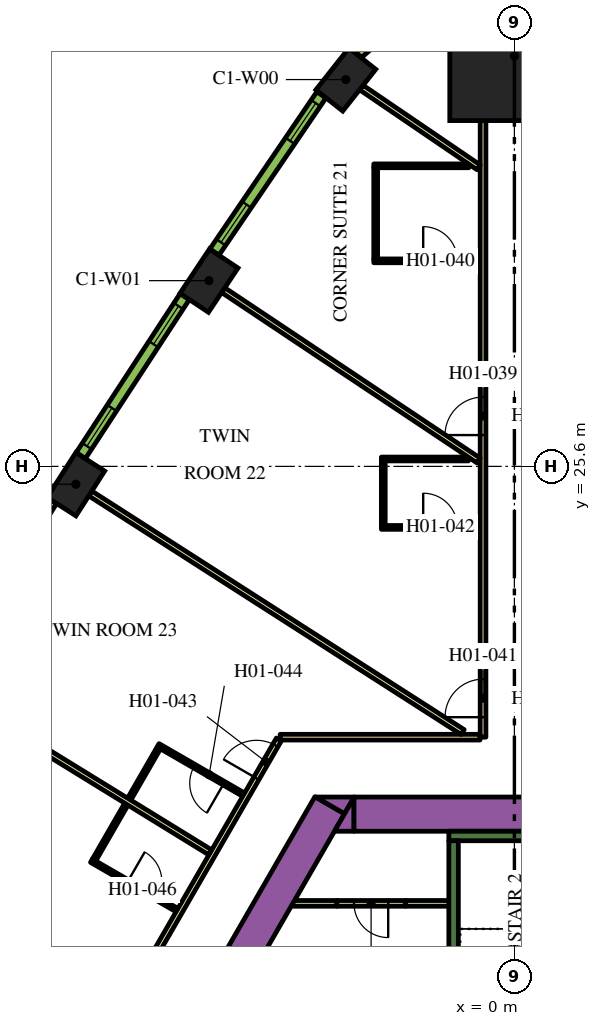
"""IFC4 building model, lengths in metres.
Left out: names, types, materials, properties, quantities, classifications, styles, units other than length and angle.
Written with IfcOpenShell. Run it as: python <this file> out.ifc"""

import sys

from ifc_helpers import new_model, si_unit, direction, frame, frame_2d, origin, origin_2d, place, context, subcontext, project, spatial, polyline, rectangle, outline, extrude, element, fill, save


model = new_model("IFC4")
c1 = context("Model", 3, precision=1e-05, world=origin(), true_north=direction((0.0, 1.0)))
c2 = subcontext(c1, "Body", "Model", "MODEL_VIEW")
j1 = project(units=[si_unit("LENGTHUNIT", "METRE"), si_unit("PLANEANGLEUNIT", "RADIAN")], contexts=[c1])
p1 = place(None, origin())
s1 = spatial("IfcSite", under=j1, at=p1, CompositionType="ELEMENT")
p2 = place(p1, origin())
s2 = spatial("IfcBuilding", under=s1, at=p2, CompositionType="ELEMENT")
p3 = place(p2, frame((0.0, 0.0, 27.6)))
s3 = spatial("IfcBuildingStorey", under=s2, at=p3, CompositionType="ELEMENT", Elevation=27.6)
p4 = place(p3, frame((0.0, 36.399, 0.0), z_axis=(0.0, 0.0, 1.0), x_axis=(0.0, 1.0, 0.0)))
e1 = element("IfcColumn", 1, at=p4, inside=s3, PredefinedType="COLUMN", context=c2, shape_type="SweptSolid", body=[
    extrude(rectangle(XDim=3.4, YDim=3.4, at=origin_2d()), origin(), (0.0, 0.0, 1.0), 3.9),
])
for number, where, z_axis, x_axis in (
    (2, (-4.436, 35.778, 0.0), (0.0, 0.0, 1.0), (-0.62, -0.784, 0.0)),
    (3, (-8.037, 30.487, 0.0), (0.0, 0.0, 1.0), (-0.555, -0.832, 0.0)),
    (4, (-11.539, 25.131, 0.0), (0.0, 0.0, 1.0), (-0.539, -0.842, 0.0)),
):
    element("IfcColumn", number, at=place(p3, frame(where, z_axis=z_axis, x_axis=x_axis)), inside=s3, PredefinedType="COLUMN", context=c2, shape_type="SweptSolid", body=[
        extrude(rectangle(XDim=1.4, YDim=0.9, at=origin_2d()), origin(), (0.0, 0.0, 1.0), 3.9),
    ])
p5 = place(p3, frame((-15.36, -1.503, 0.0), z_axis=(0.0, 0.0, 1.0), x_axis=(0.50000389221, 0.866023156604, 0.0)))
e5 = element("IfcWall", 5, at=p5, inside=s3, PredefinedType="SOLIDWALL", context=c2, shape_type="SweptSolid", body=[
    extrude(rectangle(XDim=21.0, YDim=0.9, at=frame_2d((10.5, 0.0))), origin(), (0.0, 0.0, 1.0), 3.9),
])
p6 = place(p3, origin())
e6 = element("IfcWall", 6, at=p6, inside=s3, PredefinedType="SOLIDWALL", context=c2, shape_type="SweptSolid", body=[
    extrude(outline(polyline([(-4.215, 16.9), (-4.469, 16.46), (-5.231, 16.9), (-4.215, 16.9)])), origin(), (0.0, 0.0, 1.0), 3.9),
])
p7 = place(p3, frame((-4.224, 16.45, 0.0), z_axis=(0.0, 0.0, 1.0), x_axis=(1.0, 0.0, 0.0)))
e7 = element("IfcWall", 7, at=p7, inside=s3, PredefinedType="SOLIDWALL", context=c2, shape_type="SweptSolid", body=[
    extrude(rectangle(XDim=9.488, YDim=0.9, at=frame_2d((4.744, 0.0))), origin(), (0.0, 0.0, 1.0), 3.9),
])
e8 = element("IfcWall", 8, at=p6, inside=s3, PredefinedType="SOLIDWALL", context=c2, shape_type="SweptSolid", body=[
    extrude(outline(polyline([(-4.734, 16.0), (-4.226, 16.88), (-4.226, 16.0), (-4.734, 16.0)])), origin(), (0.0, 0.0, 1.0), 3.9),
])
p8 = place(p3, frame((-1.725, 15.875, 0.0), z_axis=(0.0, 0.0, 1.0), x_axis=(1.0, 0.0, 0.0)))
e9 = element("IfcWall", 9, at=p8, inside=s3, PredefinedType="SOLIDWALL", context=c2, shape_type="SweptSolid", body=[
    extrude(rectangle(XDim=3.45, YDim=0.25, at=frame_2d((1.725, 0.0))), origin(), (0.0, 0.0, 1.0), 3.9),
])
p9 = place(p3, frame((-1.6, 8.7, 0.0), z_axis=(0.0, 0.0, 1.0), x_axis=(0.0, 1.0, 0.0)))
e10 = element("IfcWall", 10, at=p9, inside=s3, PredefinedType="SOLIDWALL", context=c2, shape_type="SweptSolid", body=[
    extrude(rectangle(XDim=7.05, YDim=0.25, at=frame_2d((3.525, 0.0))), origin(), (0.0, 0.0, 1.0), 3.9),
])
p10 = place(p3, frame((-5.851, 14.102, 0.0), z_axis=(0.0, 0.0, 1.0), x_axis=(1.0, 0.0, 0.0)))
e11 = element("IfcWall", 11, at=p10, inside=s3, PredefinedType="PARTITIONING", context=c2, shape_type="SweptSolid", body=[
    extrude(rectangle(XDim=1.18, YDim=0.15, at=frame_2d((0.59, 0.0))), origin(), (0.0, 0.0, 1.0), 2.75),
])
p11 = place(p3, frame((-2.871, 14.102, 0.0), z_axis=(0.0, 0.0, 1.0), x_axis=(1.0, 0.0, 0.0)))
e12 = element("IfcWall", 12, at=p11, inside=s3, PredefinedType="PARTITIONING", context=c2, shape_type="SweptSolid", body=[
    extrude(rectangle(XDim=1.196, YDim=0.15, at=frame_2d((0.598, 0.0))), origin(), (0.0, 0.0, 1.0), 2.75),
])
p12 = place(p3, frame((-2.871, 14.102, 0.0), z_axis=(0.0, 0.0, 1.0), x_axis=(-1.0, 0.0, 0.0)))
e13 = element("IfcWall", 13, at=p12, inside=s3, PredefinedType="PARTITIONING", context=c2, shape_type="SweptSolid", body=[
    extrude(rectangle(XDim=1.8, YDim=0.15, at=frame_2d((0.9, 0.0))), origin(), (0.0, 0.0, 1.0), 2.75),
])
p13 = place(p12, frame((0.45, 0.0, 0.0)))
e14 = element("IfcOpeningElement", 14, at=p13, cuts=e13, PredefinedType="OPENING", context=c2, shape_type="SweptSolid", body=[
    extrude(rectangle(XDim=0.9, YDim=2.1, at=frame_2d((0.45, 1.05))), frame((0.0, 0.085, 0.0), z_axis=(0.0, -1.0, 0.0), x_axis=(1.0, 0.0, 0.0)), (0.0, 0.0, 1.0), 0.17),
])
p14 = place(p3, frame((-0.825, 18.475, 0.0), z_axis=(0.0, 0.0, 1.0), x_axis=(0.0, 1.0, 0.0)))
e15 = element("IfcWall", 15, at=p14, inside=s3, PredefinedType="PARTITIONING", context=c2, shape_type="SweptSolid", body=[
    extrude(rectangle(XDim=16.224, YDim=0.15, at=frame_2d((8.112, 0.0))), origin(), (0.0, 0.0, 1.0), 2.75),
])
p15 = place(p14, frame((7.949, 0.0, 0.0)))
e16 = element("IfcOpeningElement", 16, at=p15, cuts=e15, PredefinedType="OPENING", context=c2, shape_type="SweptSolid", body=[
    extrude(rectangle(XDim=1.0, YDim=2.1, at=frame_2d((0.5, 1.05))), frame((0.0, 0.085, 0.0), z_axis=(0.0, -1.0, 0.0), x_axis=(1.0, 0.0, 0.0)), (0.0, 0.0, 1.0), 0.17),
])
p16 = place(p14, frame((0.526, 0.0, 0.0)))
e17 = element("IfcOpeningElement", 17, at=p16, cuts=e15, PredefinedType="OPENING", context=c2, shape_type="SweptSolid", body=[
    extrude(rectangle(XDim=1.0, YDim=2.1, at=frame_2d((0.5, 1.05))), frame((0.0, 0.085, 0.0), z_axis=(0.0, -1.0, 0.0), x_axis=(1.0, 0.0, 0.0)), (0.0, 0.0, 1.0), 0.17),
])
p17 = place(p3, frame((-6.163, 18.475, 0.0), z_axis=(0.0, 0.0, 1.0), x_axis=(1.0, 0.0, 0.0)))
e18 = element("IfcWall", 18, at=p17, inside=s3, PredefinedType="PARTITIONING", context=c2, shape_type="SweptSolid", body=[
    extrude(rectangle(XDim=5.258, YDim=0.15, at=frame_2d((2.629, 0.0))), origin(), (0.0, 0.0, 1.0), 2.75),
])
p18 = place(p3, frame((-19.081, -3.9, 0.0), z_axis=(0.0, 0.0, 1.0), x_axis=(0.499998313975, 0.866026377209, 0.0)))
e19 = element("IfcWall", 19, at=p18, inside=s3, PredefinedType="PARTITIONING", context=c2, shape_type="SweptSolid", body=[
    extrude(rectangle(XDim=25.766, YDim=0.15, at=frame_2d((12.883, 0.0))), origin(), (0.0, 0.0, 1.0), 2.75),
])
p19 = place(p18, frame((24.586, 0.0, 0.0)))
e20 = element("IfcOpeningElement", 20, at=p19, cuts=e19, PredefinedType="OPENING", context=c2, shape_type="SweptSolid", body=[
    extrude(rectangle(XDim=1.0, YDim=2.1, at=frame_2d((0.5, 1.05))), frame((0.0, 0.085, 0.0), z_axis=(0.0, -1.0, 0.0), x_axis=(1.0, 0.0, 0.0)), (0.0, 0.0, 1.0), 0.17),
])
p20 = place(p18, frame((16.196, 0.0, 0.0)))
e21 = element("IfcOpeningElement", 21, at=p20, cuts=e19, PredefinedType="OPENING", context=c2, shape_type="SweptSolid", body=[
    extrude(rectangle(XDim=1.0, YDim=2.1, at=frame_2d((0.5, 1.05))), frame((0.0, 0.085, 0.0), z_axis=(0.0, -1.0, 0.0), x_axis=(1.0, 0.0, 0.0)), (0.0, 0.0, 1.0), 0.17),
])
p21 = place(p18, frame((14.789, 0.0, 0.0)))
e22 = element("IfcOpeningElement", 22, at=p21, cuts=e19, PredefinedType="OPENING", context=c2, shape_type="SweptSolid", body=[
    extrude(rectangle(XDim=1.1, YDim=2.1, at=frame_2d((0.55, 1.05))), frame((0.0, 0.085, 0.0), z_axis=(0.0, -1.0, 0.0), x_axis=(1.0, 0.0, 0.0)), (0.0, 0.0, 1.0), 0.17),
])
p22 = place(p18, frame((3.698, 0.0, 0.0)))
e23 = element("IfcOpeningElement", 23, at=p22, cuts=e19, PredefinedType="OPENING", context=c2, shape_type="SweptSolid", body=[
    extrude(rectangle(XDim=1.0, YDim=2.1, at=frame_2d((0.5, 1.05))), frame((0.0, 0.085, 0.0), z_axis=(0.0, -1.0, 0.0), x_axis=(1.0, 0.0, 0.0)), (0.0, 0.0, 1.0), 0.17),
])
p23 = place(p18, frame((1.531, 0.0, 0.0)))
e24 = element("IfcOpeningElement", 24, at=p23, cuts=e19, PredefinedType="OPENING", context=c2, shape_type="SweptSolid", body=[
    extrude(rectangle(XDim=0.9, YDim=2.1, at=frame_2d((0.45, 1.05))), frame((0.0, 0.085, 0.0), z_axis=(0.0, -1.0, 0.0), x_axis=(1.0, 0.0, 0.0)), (0.0, 0.0, 1.0), 0.17),
])
p24 = place(p3, frame((-17.856, 13.999, 0.0), z_axis=(0.0, 0.0, 1.0), x_axis=(0.861371519381, -0.507975497047, 0.0)))
e25 = element("IfcWall", 25, at=p24, inside=s3, PredefinedType="PARTITIONING", context=c2, shape_type="SweptSolid", body=[
    extrude(rectangle(XDim=7.804, YDim=0.15, at=frame_2d((3.902, 0.0))), origin(), (0.0, 0.0, 1.0), 2.75),
])
p25 = place(p3, frame((-14.558, 19.475, 0.0), z_axis=(0.0, 0.0, 1.0), x_axis=(0.851829455142, -0.523819223925, 0.0)))
e26 = element("IfcWall", 26, at=p25, inside=s3, PredefinedType="PARTITIONING", context=c2, shape_type="SweptSolid", body=[
    extrude(rectangle(XDim=7.688, YDim=0.15, at=frame_2d((3.844, 0.0))), origin(), (0.0, 0.0, 1.0), 2.75),
])
p26 = place(p3, frame((-11.16, 24.888, 0.0), z_axis=(0.0, 0.0, 1.0), x_axis=(0.84199813156, -0.539480441211, 0.0)))
e27 = element("IfcWall", 27, at=p26, inside=s3, PredefinedType="PARTITIONING", context=c2, shape_type="SweptSolid", body=[
    extrude(rectangle(XDim=11.638, YDim=0.15, at=frame_2d((5.819, 0.0))), origin(), (0.0, 0.0, 1.0), 2.75),
])
p27 = place(p3, frame((-7.662, 30.238, 0.0), z_axis=(0.0, 0.0, 1.0), x_axis=(0.831882886825, -0.554951225431, 0.0)))
e28 = element("IfcWall", 28, at=p27, inside=s3, PredefinedType="PARTITIONING", context=c2, shape_type="SweptSolid", body=[
    extrude(rectangle(XDim=8.079, YDim=0.15, at=frame_2d((4.04, 0.0))), origin(), (0.0, 0.0, 1.0), 2.75),
])
p28 = place(p3, frame((-4.028, 35.569, 0.0), z_axis=(0.0, 0.0, 1.0), x_axis=(0.826730622998, -0.562597971021, 0.0)))
e29 = element("IfcWall", 29, at=p28, inside=s3, PredefinedType="PARTITIONING", context=c2, shape_type="SweptSolid", body=[
    extrude(rectangle(XDim=3.733, YDim=0.15, at=frame_2d((1.867, 0.0))), origin(), (0.0, 0.0, 1.0), 2.75),
])
p29 = place(p3, frame((-3.7, 31.009, 0.0), z_axis=(0.0, 0.0, 1.0), x_axis=(1.0, 0.0, 0.0)))
e30 = element("IfcWall", 30, at=p29, inside=s3, PredefinedType="PARTITIONING", context=c2, shape_type="SweptSolid", body=[
    extrude(rectangle(XDim=2.8, YDim=0.1, at=frame_2d((1.4, 0.0))), origin(), (0.0, 0.0, 1.0), 2.75),
])
p30 = place(p29, frame((1.3, 0.0, 0.0)))
e31 = element("IfcOpeningElement", 31, at=p30, cuts=e30, PredefinedType="OPENING", context=c2, shape_type="SweptSolid", body=[
    extrude(rectangle(XDim=0.9, YDim=2.1, at=frame_2d((0.45, 1.05))), frame((0.0, 0.06, 0.0), z_axis=(0.0, -1.0, 0.0), x_axis=(1.0, 0.0, 0.0)), (0.0, 0.0, 1.0), 0.12),
])
p31 = place(p3, frame((-3.65, 31.059, 0.0), z_axis=(0.0, 0.0, 1.0), x_axis=(0.0, 1.0, 0.0)))
e32 = element("IfcWall", 32, at=p31, inside=s3, PredefinedType="PARTITIONING", context=c2, shape_type="SweptSolid", body=[
    extrude(rectangle(XDim=2.4, YDim=0.1, at=frame_2d((1.2, 0.0))), origin(), (0.0, 0.0, 1.0), 2.75),
])
p32 = place(p3, frame((-1.2, 33.509, 0.0), z_axis=(0.0, 0.0, 1.0), x_axis=(-1.0, 0.0, 0.0)))
e33 = element("IfcWall", 33, at=p32, inside=s3, PredefinedType="PARTITIONING", context=c2, shape_type="SweptSolid", body=[
    extrude(rectangle(XDim=2.5, YDim=0.1, at=frame_2d((1.25, 0.0))), origin(), (0.0, 0.0, 1.0), 2.75),
])
p33 = place(p3, frame((-3.5, 23.995, 0.0), z_axis=(0.0, 0.0, 1.0), x_axis=(1.0, 0.0, 0.0)))
e34 = element("IfcWall", 34, at=p33, inside=s3, PredefinedType="PARTITIONING", context=c2, shape_type="SweptSolid", body=[
    extrude(rectangle(XDim=2.6, YDim=0.1, at=frame_2d((1.3, 0.0))), origin(), (0.0, 0.0, 1.0), 2.75),
])
p34 = place(p33, frame((1.1, 0.0, 0.0)))
e35 = element("IfcOpeningElement", 35, at=p34, cuts=e34, PredefinedType="OPENING", context=c2, shape_type="SweptSolid", body=[
    extrude(rectangle(XDim=0.9, YDim=2.1, at=frame_2d((0.45, 1.05))), frame((0.0, 0.06, 0.0), z_axis=(0.0, -1.0, 0.0), x_axis=(1.0, 0.0, 0.0)), (0.0, 0.0, 1.0), 0.12),
])
p35 = place(p3, frame((-3.45, 24.045, 0.0), z_axis=(0.0, 0.0, 1.0), x_axis=(0.0, 1.0, 0.0)))
e36 = element("IfcWall", 36, at=p35, inside=s3, PredefinedType="PARTITIONING", context=c2, shape_type="SweptSolid", body=[
    extrude(rectangle(XDim=1.7, YDim=0.1, at=frame_2d((0.85, 0.0))), origin(), (0.0, 0.0, 1.0), 2.75),
])
p36 = place(p3, frame((-1.21, 25.795, 0.0), z_axis=(0.0, 0.0, 1.0), x_axis=(-1.0, 0.0, 0.0)))
e37 = element("IfcWall", 37, at=p36, inside=s3, PredefinedType="PARTITIONING", context=c2, shape_type="SweptSolid", body=[
    extrude(rectangle(XDim=2.29, YDim=0.1, at=frame_2d((1.145, 0.0))), origin(), (0.0, 0.0, 1.0), 2.75),
])
p37 = place(p3, frame((-7.124, 16.961, 0.0), z_axis=(0.0, 0.0, 1.0), x_axis=(-0.866021400173, 0.500006934395, 0.0)))
e38 = element("IfcWall", 38, at=p37, inside=s3, PredefinedType="PARTITIONING", context=c2, shape_type="SweptSolid", body=[
    extrude(rectangle(XDim=2.6, YDim=0.1, at=frame_2d((1.3, 0.0))), origin(), (0.0, 0.0, 1.0), 2.75),
])
p38 = place(p37, frame((0.6, 0.0, 0.0)))
e39 = element("IfcOpeningElement", 39, at=p38, cuts=e38, PredefinedType="OPENING", context=c2, shape_type="SweptSolid", body=[
    extrude(rectangle(XDim=0.9, YDim=2.1, at=frame_2d((0.45, 1.05))), frame((0.0, 0.06, 0.0), z_axis=(0.0, -1.0, 0.0), x_axis=(1.0, 0.0, 0.0)), (0.0, 0.0, 1.0), 0.12),
])
p39 = place(p3, frame((-9.362, 18.184, 0.0), z_axis=(0.0, 0.0, 1.0), x_axis=(-0.499992328818, -0.866029832698, 0.0)))
e40 = element("IfcWall", 40, at=p39, inside=s3, PredefinedType="PARTITIONING", context=c2, shape_type="SweptSolid", body=[
    extrude(rectangle(XDim=1.54, YDim=0.1, at=frame_2d((0.77, 0.0))), origin(), (0.0, 0.0, 1.0), 2.75),
])
p40 = place(p3, frame((-11.129, 15.224, 0.0), z_axis=(0.0, 0.0, 1.0), x_axis=(0.866021400173, -0.500006934395, 0.0)))
e41 = element("IfcWall", 41, at=p40, inside=s3, PredefinedType="PARTITIONING", context=c2, shape_type="SweptSolid", body=[
    extrude(rectangle(XDim=2.6, YDim=0.1, at=frame_2d((1.3, 0.0))), origin(), (0.0, 0.0, 1.0), 2.75),
])
p41 = place(p40, frame((1.1, 0.0, 0.0)))
e42 = element("IfcOpeningElement", 42, at=p41, cuts=e41, PredefinedType="OPENING", context=c2, shape_type="SweptSolid", body=[
    extrude(rectangle(XDim=0.9, YDim=2.1, at=frame_2d((0.45, 1.05))), frame((0.0, 0.06, 0.0), z_axis=(0.0, -1.0, 0.0), x_axis=(1.0, 0.0, 0.0)), (0.0, 0.0, 1.0), 0.12),
])
p42 = place(p3, frame((-11.061, 15.242, 0.0), z_axis=(0.0, 0.0, 1.0), x_axis=(0.499976720371, 0.866038843867, 0.0)))
e43 = element("IfcWall", 43, at=p42, inside=s3, PredefinedType="PARTITIONING", context=c2, shape_type="SweptSolid", body=[
    extrude(rectangle(XDim=1.69, YDim=0.1, at=frame_2d((0.845, 0.0))), origin(), (0.0, 0.0, 1.0), 2.75),
])
p43 = place(p3, frame((-3.064, 37.395, 0.0), z_axis=(0.0, 0.0, 1.0), x_axis=(-0.749812680302, -0.661650167731, 0.0)))
e44 = element("IfcWall", 44, at=p43, inside=s3, PredefinedType="SOLIDWALL", context=c2, shape_type="SweptSolid", body=[
    extrude(rectangle(XDim=1.415, YDim=0.29, at=frame_2d((0.708, 0.0))), origin(), (0.0, 0.0, 1.0), 3.65),
])
p44 = place(p43, frame((0.258, 0.0, 0.9)))
e45 = element("IfcOpeningElement", 45, at=p44, cuts=e44, PredefinedType="OPENING", context=c2, shape_type="SweptSolid", body=[
    extrude(rectangle(XDim=0.9, YDim=2.15, at=frame_2d((0.45, 1.075))), frame((0.0, 0.155, 0.0), z_axis=(0.0, -1.0, 0.0), x_axis=(1.0, 0.0, 0.0)), (0.0, 0.0, 1.0), 0.31),
])
p45 = place(p3, frame((-5.078, 35.376, 0.0), z_axis=(0.0, 0.0, 1.0), x_axis=(-0.562610153679, -0.826722332454, 0.0)))
e46 = element("IfcWall", 46, at=p45, inside=s3, PredefinedType="SOLIDWALL", context=c2, shape_type="SweptSolid", body=[
    extrude(rectangle(XDim=5.006, YDim=0.29, at=frame_2d((2.503, 0.0))), origin(), (0.0, 0.0, 1.0), 3.65),
])
p46 = place(p45, frame((0.265, 0.0, 0.9)))
e47 = element("IfcOpeningElement", 47, at=p46, cuts=e46, PredefinedType="OPENING", context=c2, shape_type="SweptSolid", body=[
    extrude(rectangle(XDim=1.2, YDim=2.15, at=frame_2d((0.6, 1.075))), frame((0.0, 0.155, 0.0), z_axis=(0.0, -1.0, 0.0), x_axis=(1.0, 0.0, 0.0)), (0.0, 0.0, 1.0), 0.31),
])
p47 = place(p45, frame((3.495, 0.0, 0.9)))
e48 = element("IfcOpeningElement", 48, at=p47, cuts=e46, PredefinedType="OPENING", context=c2, shape_type="SweptSolid", body=[
    extrude(rectangle(XDim=1.2, YDim=2.15, at=frame_2d((0.6, 1.075))), frame((0.0, 0.155, 0.0), z_axis=(0.0, -1.0, 0.0), x_axis=(1.0, 0.0, 0.0)), (0.0, 0.0, 1.0), 0.31),
])
p48 = place(p3, frame((-8.676, 30.068, 0.0), z_axis=(0.0, 0.0, 1.0), x_axis=(-0.547204617628, -0.836998868845, 0.0)))
e49 = element("IfcWall", 49, at=p48, inside=s3, PredefinedType="SOLIDWALL", context=c2, shape_type="SweptSolid", body=[
    extrude(rectangle(XDim=4.998, YDim=0.29, at=frame_2d((2.499, 0.0))), origin(), (0.0, 0.0, 1.0), 3.65),
])
p49 = place(p48, frame((0.297, 0.0, 0.9)))
e50 = element("IfcOpeningElement", 50, at=p49, cuts=e49, PredefinedType="OPENING", context=c2, shape_type="SweptSolid", body=[
    extrude(rectangle(XDim=1.2, YDim=2.15, at=frame_2d((0.6, 1.075))), frame((0.0, 0.155, 0.0), z_axis=(0.0, -1.0, 0.0), x_axis=(1.0, 0.0, 0.0)), (0.0, 0.0, 1.0), 0.31),
])
p50 = place(p48, frame((3.501, 0.0, 0.9)))
e51 = element("IfcOpeningElement", 51, at=p50, cuts=e49, PredefinedType="OPENING", context=c2, shape_type="SweptSolid", body=[
    extrude(rectangle(XDim=1.2, YDim=2.15, at=frame_2d((0.6, 1.075))), frame((0.0, 0.155, 0.0), z_axis=(0.0, -1.0, 0.0), x_axis=(1.0, 0.0, 0.0)), (0.0, 0.0, 1.0), 0.31),
])
p51 = place(p3, frame((-12.17, 24.699, 0.0), z_axis=(0.0, 0.0, 1.0), x_axis=(-0.531688286542, -0.846940119462, 0.0)))
e52 = element("IfcWall", 52, at=p51, inside=s3, PredefinedType="SOLIDWALL", context=c2, shape_type="SweptSolid", body=[
    extrude(rectangle(XDim=4.998, YDim=0.29, at=frame_2d((2.499, 0.0))), origin(), (0.0, 0.0, 1.0), 3.65),
])
p52 = place(p51, frame((0.297, 0.0, 0.9)))
e53 = element("IfcOpeningElement", 53, at=p52, cuts=e52, PredefinedType="OPENING", context=c2, shape_type="SweptSolid", body=[
    extrude(rectangle(XDim=1.2, YDim=2.15, at=frame_2d((0.6, 1.075))), frame((0.0, 0.155, 0.0), z_axis=(0.0, -1.0, 0.0), x_axis=(1.0, 0.0, 0.0)), (0.0, 0.0, 1.0), 0.31),
])
p53 = place(p51, frame((3.501, 0.0, 0.9)))
e54 = element("IfcOpeningElement", 54, at=p53, cuts=e52, PredefinedType="OPENING", context=c2, shape_type="SweptSolid", body=[
    extrude(rectangle(XDim=1.2, YDim=2.15, at=frame_2d((0.6, 1.075))), frame((0.0, 0.155, 0.0), z_axis=(0.0, -1.0, 0.0), x_axis=(1.0, 0.0, 0.0)), (0.0, 0.0, 1.0), 0.31),
])
p54 = place(p13, origin())
e55 = element("IfcDoor", 55, at=p54, inside=s3, OperationType="SINGLE_SWING_LEFT", PredefinedType="DOOR", context=c2, shape_type="SweptSolid", body=[
    extrude(rectangle(XDim=0.9, YDim=2.1, at=frame_2d((0.45, 1.05))), frame((0.0, 0.025, 0.0), z_axis=(0.0, -1.0, 0.0), x_axis=(1.0, 0.0, 0.0)), (0.0, 0.0, 1.0), 0.05),
])
fill(e14, e55)
p55 = place(p15, origin())
e56 = element("IfcDoor", 56, at=p55, inside=s3, OperationType="SINGLE_SWING_LEFT", PredefinedType="DOOR", context=c2, shape_type="SweptSolid", body=[
    extrude(rectangle(XDim=1.0, YDim=2.1, at=frame_2d((0.5, 1.05))), frame((0.0, 0.025, 0.0), z_axis=(0.0, -1.0, 0.0), x_axis=(1.0, 0.0, 0.0)), (0.0, 0.0, 1.0), 0.05),
])
fill(e16, e56)
p56 = place(p30, origin())
e57 = element("IfcDoor", 57, at=p56, inside=s3, OperationType="SINGLE_SWING_RIGHT", PredefinedType="DOOR", context=c2, shape_type="SweptSolid", body=[
    extrude(rectangle(XDim=0.9, YDim=2.1, at=frame_2d((0.45, 1.05))), frame((0.0, 0.025, 0.0), z_axis=(0.0, -1.0, 0.0), x_axis=(1.0, 0.0, 0.0)), (0.0, 0.0, 1.0), 0.05),
])
fill(e31, e57)
p57 = place(p16, origin())
e58 = element("IfcDoor", 58, at=p57, inside=s3, OperationType="SINGLE_SWING_LEFT", PredefinedType="DOOR", context=c2, shape_type="SweptSolid", body=[
    extrude(rectangle(XDim=1.0, YDim=2.1, at=frame_2d((0.5, 1.05))), frame((0.0, 0.025, 0.0), z_axis=(0.0, -1.0, 0.0), x_axis=(1.0, 0.0, 0.0)), (0.0, 0.0, 1.0), 0.05),
])
fill(e17, e58)
p58 = place(p34, origin())
e59 = element("IfcDoor", 59, at=p58, inside=s3, OperationType="SINGLE_SWING_LEFT", PredefinedType="DOOR", context=c2, shape_type="SweptSolid", body=[
    extrude(rectangle(XDim=0.9, YDim=2.1, at=frame_2d((0.45, 1.05))), frame((0.0, 0.025, 0.0), z_axis=(0.0, -1.0, 0.0), x_axis=(1.0, 0.0, 0.0)), (0.0, 0.0, 1.0), 0.05),
])
fill(e35, e59)
p59 = place(p19, origin())
e60 = element("IfcDoor", 60, at=p59, inside=s3, OperationType="SINGLE_SWING_RIGHT", PredefinedType="DOOR", context=c2, shape_type="SweptSolid", body=[
    extrude(rectangle(XDim=1.0, YDim=2.1, at=frame_2d((0.5, 1.05))), frame((0.0, 0.025, 0.0), z_axis=(0.0, -1.0, 0.0), x_axis=(1.0, 0.0, 0.0)), (0.0, 0.0, 1.0), 0.05),
])
fill(e20, e60)
p60 = place(p38, origin())
e61 = element("IfcDoor", 61, at=p60, inside=s3, OperationType="SINGLE_SWING_LEFT", PredefinedType="DOOR", context=c2, shape_type="SweptSolid", body=[
    extrude(rectangle(XDim=0.9, YDim=2.1, at=frame_2d((0.45, 1.05))), frame((0.0, 0.025, 0.0), z_axis=(0.0, -1.0, 0.0), x_axis=(1.0, 0.0, 0.0)), (0.0, 0.0, 1.0), 0.05),
])
fill(e39, e61)
p61 = place(p41, origin())
e62 = element("IfcDoor", 62, at=p61, inside=s3, OperationType="SINGLE_SWING_RIGHT", PredefinedType="DOOR", context=c2, shape_type="SweptSolid", body=[
    extrude(rectangle(XDim=0.9, YDim=2.1, at=frame_2d((0.45, 1.05))), frame((0.0, 0.025, 0.0), z_axis=(0.0, -1.0, 0.0), x_axis=(1.0, 0.0, 0.0)), (0.0, 0.0, 1.0), 0.05),
])
fill(e42, e62)
p62 = place(p46, origin())
e63 = element("IfcWindow", 63, at=p62, inside=s3, PartitioningType="DOUBLE_PANEL_VERTICAL", PredefinedType="WINDOW", context=c2, shape_type="SweptSolid", body=[
    extrude(rectangle(XDim=1.2, YDim=2.15, at=frame_2d((0.6, 1.075))), frame((0.0, 0.015, 0.0), z_axis=(0.0, -1.0, 0.0), x_axis=(1.0, 0.0, 0.0)), (0.0, 0.0, 1.0), 0.06),
])
fill(e47, e63)
p63 = place(p47, origin())
e64 = element("IfcWindow", 64, at=p63, inside=s3, PartitioningType="DOUBLE_PANEL_VERTICAL", PredefinedType="WINDOW", context=c2, shape_type="SweptSolid", body=[
    extrude(rectangle(XDim=1.2, YDim=2.15, at=frame_2d((0.6, 1.075))), frame((0.0, 0.015, 0.0), z_axis=(0.0, -1.0, 0.0), x_axis=(1.0, 0.0, 0.0)), (0.0, 0.0, 1.0), 0.06),
])
fill(e48, e64)
p64 = place(p49, origin())
e65 = element("IfcWindow", 65, at=p64, inside=s3, PartitioningType="DOUBLE_PANEL_VERTICAL", PredefinedType="WINDOW", context=c2, shape_type="SweptSolid", body=[
    extrude(rectangle(XDim=1.2, YDim=2.15, at=frame_2d((0.6, 1.075))), frame((0.0, 0.015, 0.0), z_axis=(0.0, -1.0, 0.0), x_axis=(1.0, 0.0, 0.0)), (0.0, 0.0, 1.0), 0.06),
])
fill(e50, e65)
p65 = place(p50, origin())
e66 = element("IfcWindow", 66, at=p65, inside=s3, PartitioningType="DOUBLE_PANEL_VERTICAL", PredefinedType="WINDOW", context=c2, shape_type="SweptSolid", body=[
    extrude(rectangle(XDim=1.2, YDim=2.15, at=frame_2d((0.6, 1.075))), frame((0.0, 0.015, 0.0), z_axis=(0.0, -1.0, 0.0), x_axis=(1.0, 0.0, 0.0)), (0.0, 0.0, 1.0), 0.06),
])
fill(e51, e66)
save(model, sys.argv[1])
